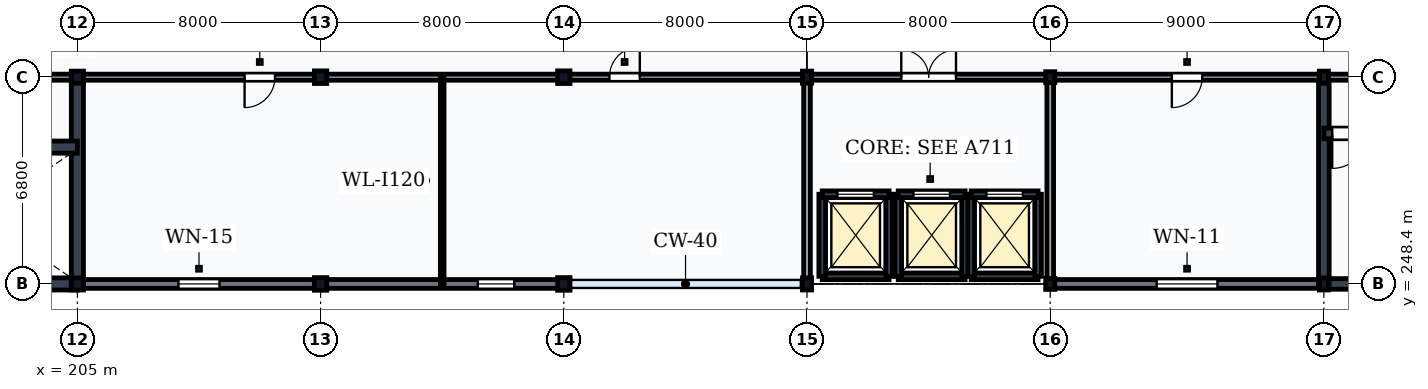
"""IFC4 building model, lengths in metres.
Left out: names, types, materials, properties, quantities, classifications, styles, units other than length and angle.
Written with IfcOpenShell. Run it as: python <this file> out.ifc"""

import sys

from ifc_helpers import new_model, si_unit, direction, frame, frame_2d, origin, origin_2d, place, context, subcontext, project, spatial, rectangle, i_section, extrude, element, fill, save


model = new_model("IFC4")
c1 = context("Model", 3, precision=1e-05, world=origin(), true_north=direction((0.0, 1.0)))
c2 = subcontext(c1, "Body", "Model", "MODEL_VIEW")
j1 = project(units=[si_unit("LENGTHUNIT", "METRE"), si_unit("PLANEANGLEUNIT", "RADIAN")], contexts=[c1])
p1 = place(None, origin())
s1 = spatial("IfcSite", under=j1, at=p1, CompositionType="ELEMENT")
p2 = place(p1, origin())
s2 = spatial("IfcBuilding", under=s1, at=p2, CompositionType="ELEMENT")
p3 = place(p2, frame((0.0, 0.0, 5.4)))
s3 = spatial("IfcBuildingStorey", under=s2, at=p3, CompositionType="ELEMENT", Elevation=5.4)
for number, where, z_axis, x_axis in (
    (1, (205.0, 248.4, 0.0), (0.0, 0.0, 1.0), (1.0, 0.0, 0.0)),
    (2, (205.0, 255.2, 0.0), (0.0, 0.0, 1.0), (1.0, 0.0, 0.0)),
):
    element("IfcColumn", number, at=place(p3, frame(where, z_axis=z_axis, x_axis=x_axis)), inside=s3, PredefinedType="COLUMN", context=c2, shape_type="SweptSolid", body=[
        extrude(i_section(OverallWidth=0.412, OverallDepth=0.435, WebThickness=0.036, FlangeThickness=0.057, FilletRadius=0.015, at=origin_2d()), origin(), (0.0, 0.0, 1.0), 5.1),
    ])
for number, where, z_axis, x_axis in (
    (3, (213.0, 248.4, 0.0), (0.0, 0.0, 1.0), (1.0, 0.0, 0.0)),
    (4, (213.0, 255.2, 0.0), (0.0, 0.0, 1.0), (1.0, 0.0, 0.0)),
    (5, (221.0, 248.4, 0.0), (0.0, 0.0, 1.0), (1.0, 0.0, 0.0)),
    (6, (221.0, 255.2, 0.0), (0.0, 0.0, 1.0), (1.0, 0.0, 0.0)),
):
    element("IfcColumn", number, at=place(p3, frame(where, z_axis=z_axis, x_axis=x_axis)), inside=s3, PredefinedType="COLUMN", context=c2, shape_type="SweptSolid", body=[
        extrude(i_section(OverallWidth=0.418, OverallDepth=0.455, WebThickness=0.042, FlangeThickness=0.068, FilletRadius=0.015, at=origin_2d()), origin(), (0.0, 0.0, 1.0), 5.1),
    ])
for number, where, z_axis, x_axis in (
    (7, (229.0, 248.4, 0.0), (0.0, 0.0, 1.0), (1.0, 0.0, 0.0)),
    (8, (229.0, 255.2, 0.0), (0.0, 0.0, 1.0), (1.0, 0.0, 0.0)),
):
    element("IfcColumn", number, at=place(p3, frame(where, z_axis=z_axis, x_axis=x_axis)), inside=s3, PredefinedType="COLUMN", context=c2, shape_type="SweptSolid", body=[
        extrude(i_section(OverallWidth=0.3, OverallDepth=0.45, WebThickness=0.014, FlangeThickness=0.026, FilletRadius=0.027, at=origin_2d()), origin(), (0.0, 0.0, 1.0), 5.1),
    ])
for number, where, z_axis, x_axis in (
    (9, (237.0, 248.4, 0.0), (0.0, 0.0, 1.0), (1.0, 0.0, 0.0)),
    (10, (237.0, 255.2, 0.0), (0.0, 0.0, 1.0), (1.0, 0.0, 0.0)),
):
    element("IfcColumn", number, at=place(p3, frame(where, z_axis=z_axis, x_axis=x_axis)), inside=s3, PredefinedType="COLUMN", context=c2, shape_type="SweptSolid", body=[
        extrude(i_section(OverallWidth=0.3, OverallDepth=0.4, WebThickness=0.013, FlangeThickness=0.024, FilletRadius=0.027, at=origin_2d()), origin(), (0.0, 0.0, 1.0), 5.1),
    ])
for number, where, z_axis, x_axis in (
    (11, (246.0, 248.4, 0.0), (0.0, 0.0, 1.0), (1.0, 0.0, 0.0)),
    (12, (246.0, 255.2, 0.0), (0.0, 0.0, 1.0), (1.0, 0.0, 0.0)),
):
    element("IfcColumn", number, at=place(p3, frame(where, z_axis=z_axis, x_axis=x_axis)), inside=s3, PredefinedType="COLUMN", context=c2, shape_type="SweptSolid", body=[
        extrude(i_section(OverallWidth=0.3, OverallDepth=0.45, WebThickness=0.014, FlangeThickness=0.026, FilletRadius=0.027, at=origin_2d()), origin(), (0.0, 0.0, 1.0), 5.1),
    ])
p4 = place(p3, frame((205.006, 248.4, 0.0), z_axis=(0.0, 0.0, 1.0), x_axis=(1.0, 0.0, 0.0)))
e13 = element("IfcWall", 13, at=p4, inside=s3, PredefinedType="SOLIDWALL", context=c2, shape_type="SweptSolid", body=[
    extrude(rectangle(XDim=7.988, YDim=0.29, at=frame_2d((3.994, 0.0))), origin(), (0.0, 0.0, 1.0), 4.548),
])
p5 = place(p4, frame((3.244, 0.0, 0.95)))
e14 = element("IfcOpeningElement", 14, at=p5, cuts=e13, PredefinedType="OPENING", context=c2, shape_type="SweptSolid", body=[
    extrude(rectangle(XDim=1.5, YDim=1.9, at=frame_2d((0.75, 0.95))), frame((0.0, 0.16, 0.0), z_axis=(0.0, -1.0, 0.0), x_axis=(1.0, 0.0, 0.0)), (0.0, 0.0, 1.0), 0.32),
])
p6 = place(p3, frame((213.006, 248.4, 0.0), z_axis=(0.0, 0.0, 1.0), x_axis=(1.0, 0.0, 0.0)))
e15 = element("IfcWall", 15, at=p6, inside=s3, PredefinedType="SOLIDWALL", context=c2, shape_type="SweptSolid", body=[
    extrude(rectangle(XDim=7.988, YDim=0.29, at=frame_2d((3.994, 0.0))), origin(), (0.0, 0.0, 1.0), 4.548),
])
p7 = place(p6, frame((5.091, 0.0, 0.95)))
e16 = element("IfcOpeningElement", 16, at=p7, cuts=e15, PredefinedType="OPENING", context=c2, shape_type="SweptSolid", body=[
    extrude(rectangle(XDim=1.35, YDim=1.8, at=frame_2d((0.675, 0.9))), frame((0.0, 0.16, 0.0), z_axis=(0.0, -1.0, 0.0), x_axis=(1.0, 0.0, 0.0)), (0.0, 0.0, 1.0), 0.32),
])
p8 = place(p3, frame((237.006, 248.4, 0.0), z_axis=(0.0, 0.0, 1.0), x_axis=(1.0, 0.0, 0.0)))
e17 = element("IfcWall", 17, at=p8, inside=s3, PredefinedType="SOLIDWALL", context=c2, shape_type="SweptSolid", body=[
    extrude(rectangle(XDim=8.988, YDim=0.29, at=frame_2d((4.494, 0.0))), origin(), (0.0, 0.0, 1.0), 4.508),
])
p9 = place(p8, frame((3.394, 0.0, 0.95)))
e18 = element("IfcOpeningElement", 18, at=p9, cuts=e17, PredefinedType="OPENING", context=c2, shape_type="SweptSolid", body=[
    extrude(rectangle(XDim=2.2, YDim=2.1, at=frame_2d((1.1, 1.05))), frame((0.0, 0.16, 0.0), z_axis=(0.0, -1.0, 0.0), x_axis=(1.0, 0.0, 0.0)), (0.0, 0.0, 1.0), 0.32),
])
p10 = place(p3, frame((197.0, 248.4, 0.0), z_axis=(0.0, 0.0, 1.0), x_axis=(1.0, 0.0, 0.0)))
e19 = element("IfcWall", 19, at=p10, inside=s3, PredefinedType="SHEAR", context=c2, shape_type="SweptSolid", body=[
    extrude(rectangle(XDim=8.0, YDim=0.4, at=frame_2d((4.0, 0.0))), origin(), (0.0, 0.0, 1.0), 4.86),
])
p11 = place(p3, frame((205.0, 248.4, 0.0), z_axis=(0.0, 0.0, 1.0), x_axis=(0.0, 1.0, 0.0)))
e20 = element("IfcWall", 20, at=p11, inside=s3, PredefinedType="SHEAR", context=c2, shape_type="SweptSolid", body=[
    extrude(rectangle(XDim=6.8, YDim=0.4, at=frame_2d((3.4, 0.0))), origin(), (0.0, 0.0, 1.0), 4.86),
])
p12 = place(p3, frame((197.0, 252.9, 0.0), z_axis=(0.0, 0.0, 1.0), x_axis=(1.0, 0.0, 0.0)))
e21 = element("IfcWall", 21, at=p12, inside=s3, PredefinedType="SHEAR", context=c2, shape_type="SweptSolid", body=[
    extrude(rectangle(XDim=8.0, YDim=0.4, at=frame_2d((4.0, 0.0))), origin(), (0.0, 0.0, 1.0), 4.86),
])
p13 = place(p12, frame((0.3, 0.0, 0.0)))
e22 = element("IfcOpeningElement", 22, at=p13, cuts=e21, PredefinedType="OPENING", context=c2, shape_type="SweptSolid", body=[
    extrude(rectangle(XDim=1.15, YDim=2.15, at=frame_2d((0.575, 1.075))), frame((0.0, 0.215, 0.0), z_axis=(0.0, -1.0, 0.0), x_axis=(1.0, 0.0, 0.0)), (0.0, 0.0, 1.0), 0.43),
])
p14 = place(p3, frame((197.0, 255.2, 0.0), z_axis=(0.0, 0.0, 1.0), x_axis=(1.0, 0.0, 0.0)))
e23 = element("IfcWall", 23, at=p14, inside=s3, PredefinedType="PARTITIONING", context=c2, shape_type="SweptSolid", body=[
    extrude(rectangle(XDim=8.0, YDim=0.2, at=frame_2d((4.0, 0.0))), origin(), (0.0, 0.0, 1.0), 4.358),
])
p15 = place(p14, frame((3.275, 0.0, 0.0)))
e24 = element("IfcOpeningElement", 24, at=p15, cuts=e23, PredefinedType="OPENING", context=c2, shape_type="SweptSolid", body=[
    extrude(rectangle(XDim=1.45, YDim=2.2, at=frame_2d((0.725, 1.1))), frame((0.0, 0.115, 0.0), z_axis=(0.0, -1.0, 0.0), x_axis=(1.0, 0.0, 0.0)), (0.0, 0.0, 1.0), 0.23),
])
p16 = place(p3, frame((246.0, 248.4, 0.0), z_axis=(0.0, 0.0, 1.0), x_axis=(1.0, 0.0, 0.0)))
e25 = element("IfcWall", 25, at=p16, inside=s3, PredefinedType="SHEAR", context=c2, shape_type="SweptSolid", body=[
    extrude(rectangle(XDim=9.0, YDim=0.35, at=frame_2d((4.5, 0.0))), origin(), (0.0, 0.0, 1.0), 4.86),
])
p17 = place(p3, frame((246.0, 248.4, 0.0), z_axis=(0.0, 0.0, 1.0), x_axis=(0.0, 1.0, 0.0)))
e26 = element("IfcWall", 26, at=p17, inside=s3, PredefinedType="SHEAR", context=c2, shape_type="SweptSolid", body=[
    extrude(rectangle(XDim=6.8, YDim=0.35, at=frame_2d((3.4, 0.0))), origin(), (0.0, 0.0, 1.0), 4.86),
])
p18 = place(p3, frame((246.0, 253.35, 0.0), z_axis=(0.0, 0.0, 1.0), x_axis=(1.0, 0.0, 0.0)))
e27 = element("IfcWall", 27, at=p18, inside=s3, PredefinedType="SHEAR", context=c2, shape_type="SweptSolid", body=[
    extrude(rectangle(XDim=9.0, YDim=0.35, at=frame_2d((4.5, 0.0))), origin(), (0.0, 0.0, 1.0), 4.86),
])
p19 = place(p18, frame((0.275, 0.0, 0.0)))
e28 = element("IfcOpeningElement", 28, at=p19, cuts=e27, PredefinedType="OPENING", context=c2, shape_type="SweptSolid", body=[
    extrude(rectangle(XDim=1.15, YDim=2.15, at=frame_2d((0.575, 1.075))), frame((0.0, 0.19, 0.0), z_axis=(0.0, -1.0, 0.0), x_axis=(1.0, 0.0, 0.0)), (0.0, 0.0, 1.0), 0.38),
])
p20 = place(p3, frame((246.0, 255.2, 0.0), z_axis=(0.0, 0.0, 1.0), x_axis=(1.0, 0.0, 0.0)))
e29 = element("IfcWall", 29, at=p20, inside=s3, PredefinedType="PARTITIONING", context=c2, shape_type="SweptSolid", body=[
    extrude(rectangle(XDim=9.0, YDim=0.2, at=frame_2d((4.5, 0.0))), origin(), (0.0, 0.0, 1.0), 4.308),
])
p21 = place(p20, frame((3.775, 0.0, 0.0)))
e30 = element("IfcOpeningElement", 30, at=p21, cuts=e29, PredefinedType="OPENING", context=c2, shape_type="SweptSolid", body=[
    extrude(rectangle(XDim=1.45, YDim=2.2, at=frame_2d((0.725, 1.1))), frame((0.0, 0.115, 0.0), z_axis=(0.0, -1.0, 0.0), x_axis=(1.0, 0.0, 0.0)), (0.0, 0.0, 1.0), 0.23),
])
p22 = place(p3, frame((229.5, 248.65, 0.0), z_axis=(0.0, 0.0, 1.0), x_axis=(1.0, 0.0, 0.0)))
e31 = element("IfcWall", 31, at=p22, inside=s3, PredefinedType="SHEAR", context=c2, shape_type="SweptSolid", body=[
    extrude(rectangle(XDim=2.2, YDim=0.22, at=frame_2d((1.1, 0.0))), origin(), (0.0, 0.0, 1.0), 4.86),
])
for number, where, z_axis, x_axis in (
    (32, (229.5, 248.65, 0.0), (0.0, 0.0, 1.0), (0.0, 1.0, 0.0)),
    (33, (231.7, 248.65, 0.0), (0.0, 0.0, 1.0), (0.0, 1.0, 0.0)),
):
    element("IfcWall", number, at=place(p3, frame(where, z_axis=z_axis, x_axis=x_axis)), inside=s3, PredefinedType="SHEAR", context=c2, shape_type="SweptSolid", body=[
        extrude(rectangle(XDim=2.7, YDim=0.22, at=frame_2d((1.35, 0.0))), origin(), (0.0, 0.0, 1.0), 4.86),
    ])
p23 = place(p3, frame((229.5, 251.35, 0.0), z_axis=(0.0, 0.0, 1.0), x_axis=(1.0, 0.0, 0.0)))
e34 = element("IfcWall", 34, at=p23, inside=s3, PredefinedType="SHEAR", context=c2, shape_type="SweptSolid", body=[
    extrude(rectangle(XDim=2.2, YDim=0.22, at=frame_2d((1.1, 0.0))), origin(), (0.0, 0.0, 1.0), 4.86),
])
p24 = place(p23, frame((0.5, 0.0, 0.0)))
e35 = element("IfcOpeningElement", 35, at=p24, cuts=e34, PredefinedType="OPENING", context=c2, shape_type="SweptSolid", body=[
    extrude(rectangle(XDim=1.2, YDim=2.2, at=frame_2d((0.6, 1.1))), frame((0.0, 0.125, 0.0), z_axis=(0.0, -1.0, 0.0), x_axis=(1.0, 0.0, 0.0)), (0.0, 0.0, 1.0), 0.25),
])
p25 = place(p3, frame((232.0, 248.65, 0.0), z_axis=(0.0, 0.0, 1.0), x_axis=(1.0, 0.0, 0.0)))
e36 = element("IfcWall", 36, at=p25, inside=s3, PredefinedType="SHEAR", context=c2, shape_type="SweptSolid", body=[
    extrude(rectangle(XDim=2.2, YDim=0.22, at=frame_2d((1.1, 0.0))), origin(), (0.0, 0.0, 1.0), 4.86),
])
for number, where, z_axis, x_axis in (
    (37, (232.0, 248.65, 0.0), (0.0, 0.0, 1.0), (0.0, 1.0, 0.0)),
    (38, (234.2, 248.65, 0.0), (0.0, 0.0, 1.0), (0.0, 1.0, 0.0)),
):
    element("IfcWall", number, at=place(p3, frame(where, z_axis=z_axis, x_axis=x_axis)), inside=s3, PredefinedType="SHEAR", context=c2, shape_type="SweptSolid", body=[
        extrude(rectangle(XDim=2.7, YDim=0.22, at=frame_2d((1.35, 0.0))), origin(), (0.0, 0.0, 1.0), 4.86),
    ])
p26 = place(p3, frame((232.0, 251.35, 0.0), z_axis=(0.0, 0.0, 1.0), x_axis=(1.0, 0.0, 0.0)))
e39 = element("IfcWall", 39, at=p26, inside=s3, PredefinedType="SHEAR", context=c2, shape_type="SweptSolid", body=[
    extrude(rectangle(XDim=2.2, YDim=0.22, at=frame_2d((1.1, 0.0))), origin(), (0.0, 0.0, 1.0), 4.86),
])
p27 = place(p26, frame((0.5, 0.0, 0.0)))
e40 = element("IfcOpeningElement", 40, at=p27, cuts=e39, PredefinedType="OPENING", context=c2, shape_type="SweptSolid", body=[
    extrude(rectangle(XDim=1.2, YDim=2.2, at=frame_2d((0.6, 1.1))), frame((0.0, 0.125, 0.0), z_axis=(0.0, -1.0, 0.0), x_axis=(1.0, 0.0, 0.0)), (0.0, 0.0, 1.0), 0.25),
])
p28 = place(p3, frame((234.4, 248.65, 0.0), z_axis=(0.0, 0.0, 1.0), x_axis=(1.0, 0.0, 0.0)))
e41 = element("IfcWall", 41, at=p28, inside=s3, PredefinedType="SHEAR", context=c2, shape_type="SweptSolid", body=[
    extrude(rectangle(XDim=2.2, YDim=0.22, at=frame_2d((1.1, 0.0))), origin(), (0.0, 0.0, 1.0), 4.86),
])
for number, where, z_axis, x_axis in (
    (42, (234.4, 248.65, 0.0), (0.0, 0.0, 1.0), (0.0, 1.0, 0.0)),
    (43, (236.6, 248.65, 0.0), (0.0, 0.0, 1.0), (0.0, 1.0, 0.0)),
):
    element("IfcWall", number, at=place(p3, frame(where, z_axis=z_axis, x_axis=x_axis)), inside=s3, PredefinedType="SHEAR", context=c2, shape_type="SweptSolid", body=[
        extrude(rectangle(XDim=2.7, YDim=0.22, at=frame_2d((1.35, 0.0))), origin(), (0.0, 0.0, 1.0), 4.86),
    ])
p29 = place(p3, frame((234.4, 251.35, 0.0), z_axis=(0.0, 0.0, 1.0), x_axis=(1.0, 0.0, 0.0)))
e44 = element("IfcWall", 44, at=p29, inside=s3, PredefinedType="SHEAR", context=c2, shape_type="SweptSolid", body=[
    extrude(rectangle(XDim=2.2, YDim=0.22, at=frame_2d((1.1, 0.0))), origin(), (0.0, 0.0, 1.0), 4.86),
])
p30 = place(p29, frame((0.5, 0.0, 0.0)))
e45 = element("IfcOpeningElement", 45, at=p30, cuts=e44, PredefinedType="OPENING", context=c2, shape_type="SweptSolid", body=[
    extrude(rectangle(XDim=1.2, YDim=2.2, at=frame_2d((0.6, 1.1))), frame((0.0, 0.125, 0.0), z_axis=(0.0, -1.0, 0.0), x_axis=(1.0, 0.0, 0.0)), (0.0, 0.0, 1.0), 0.25),
])
for number, where, z_axis, x_axis in (
    (46, (229.0, 248.4, 0.0), (0.0, 0.0, 1.0), (0.0, 1.0, 0.0)),
    (47, (237.0, 248.4, 0.0), (0.0, 0.0, 1.0), (0.0, 1.0, 0.0)),
):
    element("IfcWall", number, at=place(p3, frame(where, z_axis=z_axis, x_axis=x_axis)), inside=s3, PredefinedType="PARTITIONING", context=c2, shape_type="SweptSolid", body=[
        extrude(rectangle(XDim=6.8, YDim=0.22, at=frame_2d((3.4, 0.0))), origin(), (0.0, 0.0, 1.0), 4.498),
    ])
p31 = place(p3, frame((229.0, 255.2, 0.0), z_axis=(0.0, 0.0, 1.0), x_axis=(1.0, 0.0, 0.0)))
e48 = element("IfcWall", 48, at=p31, inside=s3, PredefinedType="PARTITIONING", context=c2, shape_type="SweptSolid", body=[
    extrude(rectangle(XDim=8.0, YDim=0.2, at=frame_2d((4.0, 0.0))), origin(), (0.0, 0.0, 1.0), 4.408),
])
p32 = place(p31, frame((3.1, 0.0, 0.0)))
e49 = element("IfcOpeningElement", 49, at=p32, cuts=e48, PredefinedType="OPENING", context=c2, shape_type="SweptSolid", body=[
    extrude(rectangle(XDim=1.8, YDim=2.4, at=frame_2d((0.9, 1.2))), frame((0.0, 0.115, 0.0), z_axis=(0.0, -1.0, 0.0), x_axis=(1.0, 0.0, 0.0)), (0.0, 0.0, 1.0), 0.23),
])
p33 = place(p3, frame((205.0, 255.2, 0.0), z_axis=(0.0, 0.0, 1.0), x_axis=(1.0, 0.0, 0.0)))
e50 = element("IfcWall", 50, at=p33, inside=s3, PredefinedType="PARTITIONING", context=c2, shape_type="SweptSolid", body=[
    extrude(rectangle(XDim=24.0, YDim=0.2, at=frame_2d((12.0, 0.0))), origin(), (0.0, 0.0, 1.0), 4.358),
])
p34 = place(p33, frame((5.5, 0.0, 0.0)))
e51 = element("IfcOpeningElement", 51, at=p34, cuts=e50, PredefinedType="OPENING", context=c2, shape_type="SweptSolid", body=[
    extrude(rectangle(XDim=1.0, YDim=2.1, at=frame_2d((0.5, 1.05))), frame((0.0, 0.115, 0.0), z_axis=(0.0, -1.0, 0.0), x_axis=(1.0, 0.0, 0.0)), (0.0, 0.0, 1.0), 0.23),
])
p35 = place(p33, frame((17.5, 0.0, 0.0)))
e52 = element("IfcOpeningElement", 52, at=p35, cuts=e50, PredefinedType="OPENING", context=c2, shape_type="SweptSolid", body=[
    extrude(rectangle(XDim=1.0, YDim=2.1, at=frame_2d((0.5, 1.05))), frame((0.0, 0.115, 0.0), z_axis=(0.0, -1.0, 0.0), x_axis=(1.0, 0.0, 0.0)), (0.0, 0.0, 1.0), 0.23),
])
p36 = place(p3, frame((217.0, 248.4, 0.0), z_axis=(0.0, 0.0, 1.0), x_axis=(0.0, 1.0, 0.0)))
e53 = element("IfcWall", 53, at=p36, inside=s3, PredefinedType="PARTITIONING", context=c2, shape_type="SweptSolid", body=[
    extrude(rectangle(XDim=6.8, YDim=0.12, at=frame_2d((3.4, 0.0))), origin(), (0.0, 0.0, 1.0), 4.618),
])
p37 = place(p3, frame((237.0, 255.2, 0.0), z_axis=(0.0, 0.0, 1.0), x_axis=(1.0, 0.0, 0.0)))
e54 = element("IfcWall", 54, at=p37, inside=s3, PredefinedType="PARTITIONING", context=c2, shape_type="SweptSolid", body=[
    extrude(rectangle(XDim=9.0, YDim=0.2, at=frame_2d((4.5, 0.0))), origin(), (0.0, 0.0, 1.0), 4.308),
])
p38 = place(p37, frame((4.0, 0.0, 0.0)))
e55 = element("IfcOpeningElement", 55, at=p38, cuts=e54, PredefinedType="OPENING", context=c2, shape_type="SweptSolid", body=[
    extrude(rectangle(XDim=1.0, YDim=2.1, at=frame_2d((0.5, 1.05))), frame((0.0, 0.115, 0.0), z_axis=(0.0, -1.0, 0.0), x_axis=(1.0, 0.0, 0.0)), (0.0, 0.0, 1.0), 0.23),
])
p39 = place(p5, origin())
e56 = element("IfcWindow", 56, at=p39, inside=s3, PartitioningType="SINGLE_PANEL", PredefinedType="WINDOW", context=c2, shape_type="SweptSolid", body=[
    extrude(rectangle(XDim=1.5, YDim=1.9, at=frame_2d((0.75, 0.95))), frame((0.0, 0.03, 0.0), z_axis=(0.0, -1.0, 0.0), x_axis=(1.0, 0.0, 0.0)), (0.0, 0.0, 1.0), 0.06),
])
fill(e14, e56)
p40 = place(p7, origin())
e57 = element("IfcWindow", 57, at=p40, inside=s3, PartitioningType="SINGLE_PANEL", PredefinedType="WINDOW", context=c2, shape_type="SweptSolid", body=[
    extrude(rectangle(XDim=1.35, YDim=1.8, at=frame_2d((0.675, 0.9))), frame((0.0, 0.03, 0.0), z_axis=(0.0, -1.0, 0.0), x_axis=(1.0, 0.0, 0.0)), (0.0, 0.0, 1.0), 0.06),
])
fill(e16, e57)
p41 = place(p9, origin())
e58 = element("IfcWindow", 58, at=p41, inside=s3, PartitioningType="DOUBLE_PANEL_VERTICAL", PredefinedType="WINDOW", context=c2, shape_type="SweptSolid", body=[
    extrude(rectangle(XDim=2.2, YDim=2.1, at=frame_2d((1.1, 1.05))), frame((0.0, 0.03, 0.0), z_axis=(0.0, -1.0, 0.0), x_axis=(1.0, 0.0, 0.0)), (0.0, 0.0, 1.0), 0.06),
])
fill(e18, e58)
p42 = place(p19, frame((1.15, 0.0, 0.0), z_axis=(0.0, 0.0, 1.0), x_axis=(-1.0, 0.0, 0.0)))
e59 = element("IfcDoor", 59, at=p42, inside=s3, OperationType="SINGLE_SWING_RIGHT", PredefinedType="DOOR", context=c2, shape_type="SweptSolid", body=[
    extrude(rectangle(XDim=1.15, YDim=2.15, at=frame_2d((0.575, 1.075))), frame((0.0, 0.025, 0.0), z_axis=(0.0, -1.0, 0.0), x_axis=(1.0, 0.0, 0.0)), (0.0, 0.0, 1.0), 0.05),
])
fill(e28, e59)
p43 = place(p24, origin())
e60 = element("IfcDoor", 60, at=p43, inside=s3, OperationType="DOUBLE_DOOR_SLIDING", PredefinedType="USERDEFINED", context=c2, shape_type="SweptSolid", body=[
    extrude(rectangle(XDim=1.2, YDim=2.2, at=frame_2d((0.6, 1.1))), frame((0.0, 0.025, 0.0), z_axis=(0.0, -1.0, 0.0), x_axis=(1.0, 0.0, 0.0)), (0.0, 0.0, 1.0), 0.05),
])
fill(e35, e60)
p44 = place(p27, origin())
e61 = element("IfcDoor", 61, at=p44, inside=s3, OperationType="DOUBLE_DOOR_SLIDING", PredefinedType="USERDEFINED", context=c2, shape_type="SweptSolid", body=[
    extrude(rectangle(XDim=1.2, YDim=2.2, at=frame_2d((0.6, 1.1))), frame((0.0, 0.025, 0.0), z_axis=(0.0, -1.0, 0.0), x_axis=(1.0, 0.0, 0.0)), (0.0, 0.0, 1.0), 0.05),
])
fill(e40, e61)
p45 = place(p30, origin())
e62 = element("IfcDoor", 62, at=p45, inside=s3, OperationType="DOUBLE_DOOR_SLIDING", PredefinedType="USERDEFINED", context=c2, shape_type="SweptSolid", body=[
    extrude(rectangle(XDim=1.2, YDim=2.2, at=frame_2d((0.6, 1.1))), frame((0.0, 0.025, 0.0), z_axis=(0.0, -1.0, 0.0), x_axis=(1.0, 0.0, 0.0)), (0.0, 0.0, 1.0), 0.05),
])
fill(e45, e62)
p46 = place(p32, frame((1.8, 0.0, 0.0), z_axis=(0.0, 0.0, 1.0), x_axis=(-1.0, 0.0, 0.0)))
e63 = element("IfcDoor", 63, at=p46, inside=s3, OperationType="DOUBLE_DOOR_SINGLE_SWING", PredefinedType="DOOR", context=c2, shape_type="SweptSolid", body=[
    extrude(rectangle(XDim=1.8, YDim=2.4, at=frame_2d((0.9, 1.2))), frame((0.0, 0.025, 0.0), z_axis=(0.0, -1.0, 0.0), x_axis=(1.0, 0.0, 0.0)), (0.0, 0.0, 1.0), 0.05),
])
fill(e49, e63)
p47 = place(p34, frame((1.0, 0.0, 0.0), z_axis=(0.0, 0.0, 1.0), x_axis=(-1.0, 0.0, 0.0)))
e64 = element("IfcDoor", 64, at=p47, inside=s3, OperationType="SINGLE_SWING_RIGHT", PredefinedType="DOOR", context=c2, shape_type="SweptSolid", body=[
    extrude(rectangle(XDim=1.0, YDim=2.1, at=frame_2d((0.5, 1.05))), frame((0.0, 0.025, 0.0), z_axis=(0.0, -1.0, 0.0), x_axis=(1.0, 0.0, 0.0)), (0.0, 0.0, 1.0), 0.05),
])
fill(e51, e64)
p48 = place(p35, frame((1.0, 0.0, 0.0), z_axis=(0.0, 0.0, 1.0), x_axis=(-1.0, 0.0, 0.0)))
e65 = element("IfcDoor", 65, at=p48, inside=s3, OperationType="SINGLE_SWING_LEFT", PredefinedType="DOOR", context=c2, shape_type="SweptSolid", body=[
    extrude(rectangle(XDim=1.0, YDim=2.1, at=frame_2d((0.5, 1.05))), frame((0.0, 0.025, 0.0), z_axis=(0.0, -1.0, 0.0), x_axis=(1.0, 0.0, 0.0)), (0.0, 0.0, 1.0), 0.05),
])
fill(e52, e65)
p49 = place(p38, frame((1.0, 0.0, 0.0), z_axis=(0.0, 0.0, 1.0), x_axis=(-1.0, 0.0, 0.0)))
e66 = element("IfcDoor", 66, at=p49, inside=s3, OperationType="SINGLE_SWING_LEFT", PredefinedType="DOOR", context=c2, shape_type="SweptSolid", body=[
    extrude(rectangle(XDim=1.0, YDim=2.1, at=frame_2d((0.5, 1.05))), frame((0.0, 0.025, 0.0), z_axis=(0.0, -1.0, 0.0), x_axis=(1.0, 0.0, 0.0)), (0.0, 0.0, 1.0), 0.05),
])
fill(e55, e66)
save(model, sys.argv[1])
